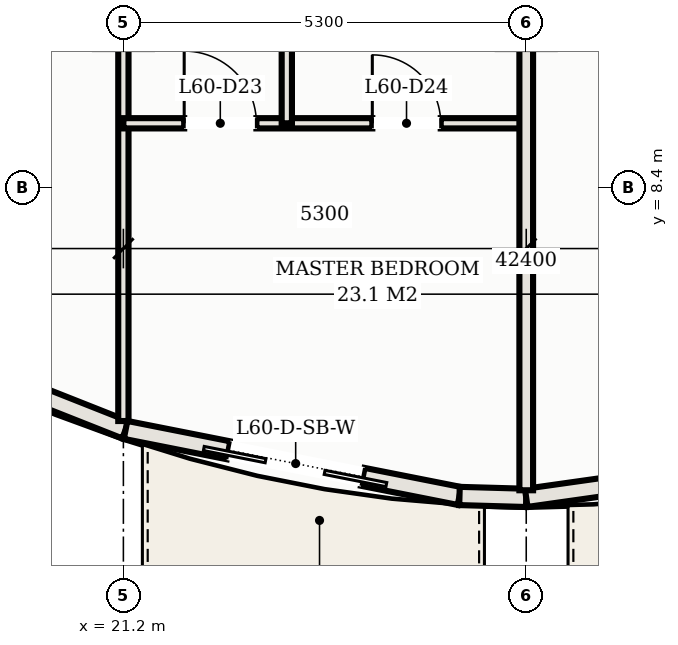
"""IFC4 building model, lengths in metres.
Left out: names, types, materials, properties, quantities, classifications, styles, units other than length and angle.
Written with IfcOpenShell. Run it as: python <this file> out.ifc"""

import sys

from ifc_helpers import new_model, si_unit, direction, frame, frame_2d, origin, place, context, subcontext, project, spatial, rectangle, extrude, element, fill, save


model = new_model("IFC4")
c1 = context("Model", 3, precision=1e-05, world=origin(), true_north=direction((0.0, 1.0)))
c2 = subcontext(c1, "Body", "Model", "MODEL_VIEW")
j1 = project(units=[si_unit("LENGTHUNIT", "METRE"), si_unit("PLANEANGLEUNIT", "RADIAN")], contexts=[c1])
p1 = place(None, origin())
s1 = spatial("IfcSite", under=j1, at=p1, CompositionType="ELEMENT")
p2 = place(p1, origin())
s2 = spatial("IfcBuilding", under=s1, at=p2, CompositionType="ELEMENT")
p3 = place(p2, frame((0.0, 0.0, 219.8)))
s3 = spatial("IfcBuildingStorey", under=s2, at=p3, CompositionType="ELEMENT", Elevation=219.8)
p4 = place(p3, frame((19.444, 5.92, 0.0), z_axis=(0.0, 0.0, 1.0), x_axis=(0.92993442177, -0.367725401906, 0.0)))
e1 = element("IfcWall", 1, at=p4, inside=s3, PredefinedType="SOLIDWALL", context=c2, shape_type="SweptSolid", body=[
    extrude(rectangle(XDim=1.919, YDim=0.24, at=frame_2d((0.96, 0.0))), origin(), (0.0, 0.0, 1.0), 3.11),
])
p5 = place(p3, frame((21.229, 5.214, 0.0), z_axis=(0.0, 0.0, 1.0), x_axis=(0.980985349685, -0.194081796425, 0.0)))
e2 = element("IfcWall", 2, at=p5, inside=s3, PredefinedType="SOLIDWALL", context=c2, shape_type="SweptSolid", body=[
    extrude(rectangle(XDim=4.478, YDim=0.24, at=frame_2d((2.239, 0.0))), origin(), (0.0, 0.0, 1.0), 3.11),
])
p6 = place(p5, frame((1.381, 0.0, 0.0)))
e3 = element("IfcOpeningElement", 3, at=p6, cuts=e2, PredefinedType="OPENING", context=c2, shape_type="SweptSolid", body=[
    extrude(rectangle(XDim=1.8, YDim=2.2, at=frame_2d((0.9, 1.1))), frame((0.0, 0.13, 0.0), z_axis=(0.0, -1.0, 0.0), x_axis=(1.0, 0.0, 0.0)), (0.0, 0.0, 1.0), 0.26),
])
p7 = place(p3, frame((25.622, 4.345, 0.0), z_axis=(0.0, 0.0, 1.0), x_axis=(0.999597960231, -0.028353446035, 0.0)))
e4 = element("IfcWall", 4, at=p7, inside=s3, PredefinedType="SOLIDWALL", context=c2, shape_type="SweptSolid", body=[
    extrude(rectangle(XDim=0.878, YDim=0.24, at=frame_2d((0.439, 0.0))), origin(), (0.0, 0.0, 1.0), 3.11),
])
p8 = place(p3, frame((26.5, 4.32, 0.0), z_axis=(0.0, 0.0, 1.0), x_axis=(0.990156470874, 0.139964864115, 0.0)))
e5 = element("IfcWall", 5, at=p8, inside=s3, PredefinedType="SOLIDWALL", context=c2, shape_type="SweptSolid", body=[
    extrude(rectangle(XDim=4.436, YDim=0.24, at=frame_2d((2.218, 0.0))), origin(), (0.0, 0.0, 1.0), 3.11),
])
p9 = place(p8, frame((1.318, 0.0, 0.0)))
e6 = element("IfcOpeningElement", 6, at=p9, cuts=e5, PredefinedType="OPENING", context=c2, shape_type="SweptSolid", body=[
    extrude(rectangle(XDim=1.8, YDim=2.2, at=frame_2d((0.9, 1.1))), frame((0.0, 0.13, 0.0), z_axis=(0.0, -1.0, 0.0), x_axis=(1.0, 0.0, 0.0)), (0.0, 0.0, 1.0), 0.26),
])
p10 = place(p3, frame((21.2, 5.331, 0.0), z_axis=(0.0, 0.0, 1.0), x_axis=(0.0, 1.0, 0.0)))
e7 = element("IfcWall", 7, at=p10, inside=s3, PredefinedType="PARTITIONING", context=c2, shape_type="SweptSolid", body=[
    extrude(rectangle(XDim=16.769, YDim=0.135, at=frame_2d((8.385, 0.0))), origin(), (0.0, 0.0, 1.0), 2.43),
])
p11 = place(p10, frame((14.984, 0.0, 0.0)))
e8 = element("IfcOpeningElement", 8, at=p11, cuts=e7, PredefinedType="OPENING", context=c2, shape_type="SweptSolid", body=[
    extrude(rectangle(XDim=0.92, YDim=2.15, at=frame_2d((0.46, 1.075))), frame((0.0, 0.078, 0.0), z_axis=(0.0, -1.0, 0.0), x_axis=(1.0, 0.0, 0.0)), (0.0, 0.0, 1.0), 0.155),
])
p12 = place(p3, frame((21.2, 9.248, 0.0), z_axis=(0.0, 0.0, 1.0), x_axis=(1.0, 0.0, 0.0)))
e9 = element("IfcWall", 9, at=p12, inside=s3, PredefinedType="PARTITIONING", context=c2, shape_type="SweptSolid", body=[
    extrude(rectangle(XDim=5.3, YDim=0.135, at=frame_2d((2.65, 0.0))), origin(), (0.0, 0.0, 1.0), 2.43),
])
p13 = place(p12, frame((0.8, 0.0, 0.0)))
e10 = element("IfcOpeningElement", 10, at=p13, cuts=e9, PredefinedType="OPENING", context=c2, shape_type="SweptSolid", body=[
    extrude(rectangle(XDim=0.95, YDim=2.15, at=frame_2d((0.475, 1.075))), frame((0.0, 0.078, 0.0), z_axis=(0.0, -1.0, 0.0), x_axis=(1.0, 0.0, 0.0)), (0.0, 0.0, 1.0), 0.155),
])
p14 = place(p12, frame((3.275, 0.0, 0.0)))
e11 = element("IfcOpeningElement", 11, at=p14, cuts=e9, PredefinedType="OPENING", context=c2, shape_type="SweptSolid", body=[
    extrude(rectangle(XDim=0.9, YDim=2.15, at=frame_2d((0.45, 1.075))), frame((0.0, 0.078, 0.0), z_axis=(0.0, -1.0, 0.0), x_axis=(1.0, 0.0, 0.0)), (0.0, 0.0, 1.0), 0.155),
])
p15 = place(p3, frame((23.35, 9.248, 0.0), z_axis=(0.0, 0.0, 1.0), x_axis=(0.0, 1.0, 0.0)))
e12 = element("IfcWall", 12, at=p15, inside=s3, PredefinedType="PARTITIONING", context=c2, shape_type="SweptSolid", body=[
    extrude(rectangle(XDim=12.852, YDim=0.135, at=frame_2d((6.426, 0.0))), origin(), (0.0, 0.0, 1.0), 2.43),
])
p16 = place(p15, frame((5.153, 0.0, 0.0)))
e13 = element("IfcOpeningElement", 13, at=p16, cuts=e12, PredefinedType="OPENING", context=c2, shape_type="SweptSolid", body=[
    extrude(rectangle(XDim=0.92, YDim=2.15, at=frame_2d((0.46, 1.075))), frame((0.0, 0.078, 0.0), z_axis=(0.0, -1.0, 0.0), x_axis=(1.0, 0.0, 0.0)), (0.0, 0.0, 1.0), 0.155),
])
p17 = place(p3, frame((26.5, 4.42, 0.0), z_axis=(0.0, 0.0, 1.0), x_axis=(0.0, 1.0, 0.0)))
e14 = element("IfcWall", 14, at=p17, inside=s3, PredefinedType="PARTITIONING", context=c2, shape_type="SweptSolid", body=[
    extrude(rectangle(XDim=17.68, YDim=0.18, at=frame_2d((8.84, 0.0))), origin(), (0.0, 0.0, 1.0), 2.43),
])
p18 = place(p6, frame((1.8, 0.0, 0.0), z_axis=(0.0, 0.0, 1.0), x_axis=(-1.0, 0.0, 0.0)))
e15 = element("IfcDoor", 15, at=p18, inside=s3, OperationType="DOUBLE_DOOR_SLIDING", PredefinedType="DOOR", context=c2, shape_type="SweptSolid", body=[
    extrude(rectangle(XDim=1.8, YDim=2.2, at=frame_2d((0.9, 1.1))), frame((0.0, 0.025, 0.0), z_axis=(0.0, -1.0, 0.0), x_axis=(1.0, 0.0, 0.0)), (0.0, 0.0, 1.0), 0.05),
])
fill(e3, e15)
p19 = place(p13, origin())
e16 = element("IfcDoor", 16, at=p19, inside=s3, OperationType="SINGLE_SWING_LEFT", PredefinedType="DOOR", context=c2, shape_type="SweptSolid", body=[
    extrude(rectangle(XDim=0.95, YDim=2.15, at=frame_2d((0.475, 1.075))), frame((0.0, 0.025, 0.0), z_axis=(0.0, -1.0, 0.0), x_axis=(1.0, 0.0, 0.0)), (0.0, 0.0, 1.0), 0.05),
])
fill(e10, e16)
p20 = place(p14, origin())
e17 = element("IfcDoor", 17, at=p20, inside=s3, OperationType="SINGLE_SWING_LEFT", PredefinedType="DOOR", context=c2, shape_type="SweptSolid", body=[
    extrude(rectangle(XDim=0.9, YDim=2.15, at=frame_2d((0.45, 1.075))), frame((0.0, 0.025, 0.0), z_axis=(0.0, -1.0, 0.0), x_axis=(1.0, 0.0, 0.0)), (0.0, 0.0, 1.0), 0.05),
])
fill(e11, e17)
save(model, sys.argv[1])
